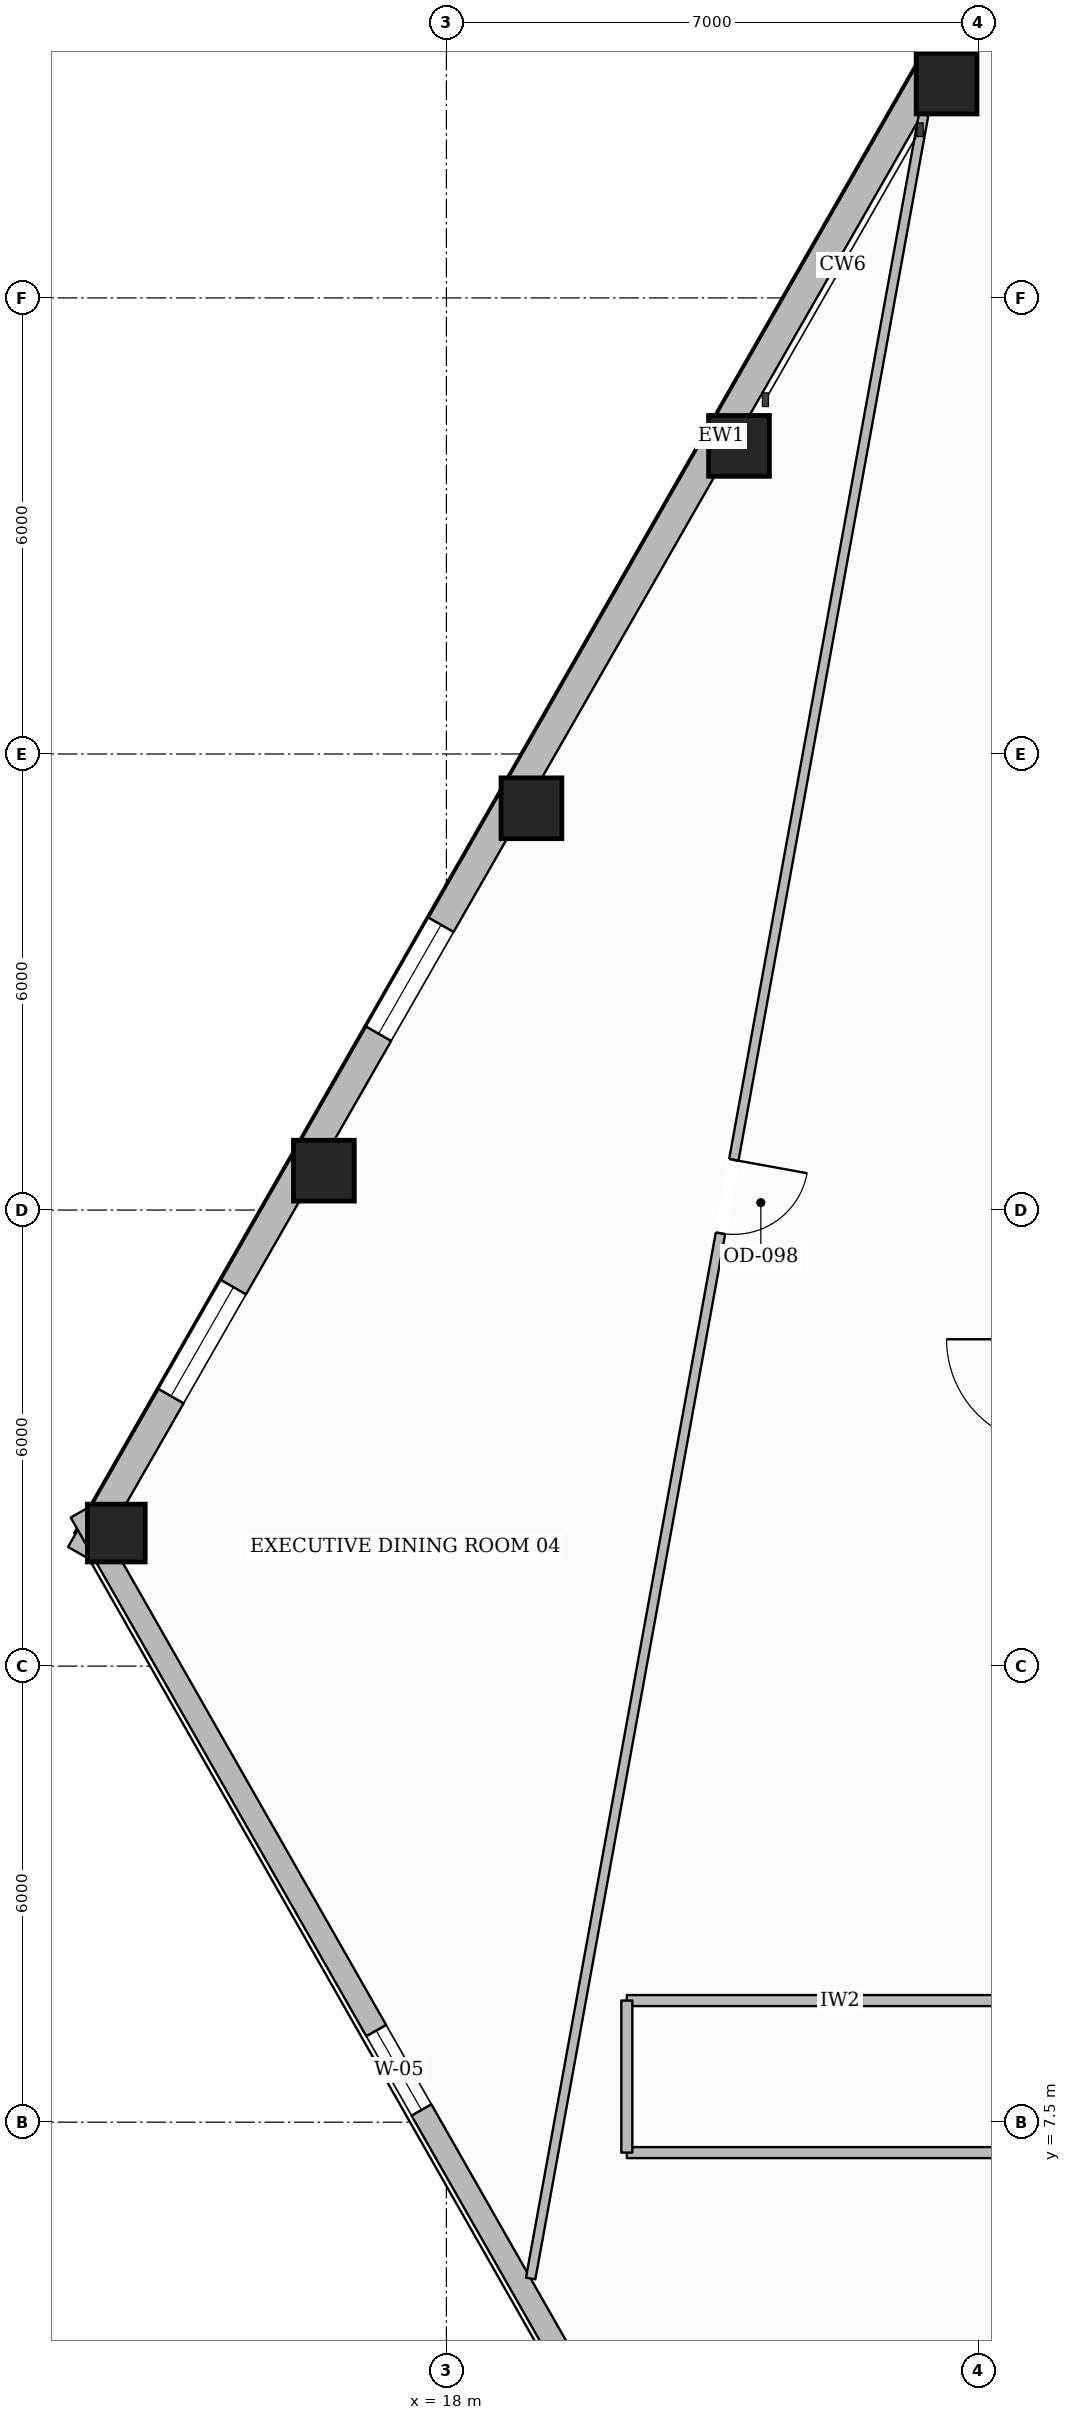
"""IFC4 building model, lengths in metres.
Left out: names, types, materials, properties, quantities, classifications, styles, units other than length and angle.
Written with IfcOpenShell. Run it as: python <this file> out.ifc"""

import sys

from ifc_helpers import new_model, si_unit, direction, frame, frame_2d, origin, origin_2d, place, context, subcontext, project, spatial, rectangle, hollow_rectangle, extrude, element, fill, save


model = new_model("IFC4")
c1 = context("Model", 3, precision=1e-05, world=origin(), true_north=direction((0.0, 1.0)))
c2 = subcontext(c1, "Body", "Model", "MODEL_VIEW")
j1 = project(units=[si_unit("LENGTHUNIT", "METRE"), si_unit("PLANEANGLEUNIT", "RADIAN")], contexts=[c1])
p1 = place(None, origin())
s1 = spatial("IfcSite", under=j1, at=p1, CompositionType="ELEMENT")
p2 = place(p1, origin())
s2 = spatial("IfcBuilding", under=s1, at=p2, CompositionType="ELEMENT")
p3 = place(p2, frame((0.0, 0.0, 17.55)))
s3 = spatial("IfcBuildingStorey", under=s2, at=p3, CompositionType="ELEMENT", Elevation=17.55)
for number, where, z_axis, x_axis in (
    (1, (24.58, 34.32, 0.0), (0.0, 0.0, 1.0), (1.0, 0.0, 0.0)),
    (2, (21.849, 29.553, 0.0), (0.0, 0.0, 1.0), (1.0, 0.0, 0.0)),
    (3, (19.119, 24.785, 0.0), (0.0, 0.0, 1.0), (1.0, 0.0, 0.0)),
    (4, (16.388, 20.018, 0.0), (0.0, 0.0, 1.0), (1.0, 0.0, 0.0)),
):
    element("IfcColumn", number, at=place(p3, frame(where, z_axis=z_axis, x_axis=x_axis)), inside=s3, PredefinedType="COLUMN", context=c2, shape_type="SweptSolid", body=[
        extrude(hollow_rectangle(XDim=0.8, YDim=0.8, WallThickness=0.036, at=origin_2d()), origin(), (0.0, 0.0, 1.0), 3.59),
    ])
p4 = place(p3, frame((13.657, 15.25, 0.0), z_axis=(0.0, 0.0, 1.0), x_axis=(1.0, 0.0, 0.0)))
e5 = element("IfcColumn", 5, at=p4, inside=s3, PredefinedType="COLUMN", context=c2, shape_type="SweptSolid", body=[
    extrude(hollow_rectangle(XDim=0.76, YDim=0.76, WallThickness=0.035, at=origin_2d()), origin(), (0.0, 0.0, 1.0), 3.59),
])
p5 = place(p3, frame((13.187, 14.973, 0.0), z_axis=(0.0, 0.0, 1.0), x_axis=(0.497033240721, 0.867731500879, 0.0)))
e6 = element("IfcWall", 6, at=p5, inside=s3, PredefinedType="STANDARD", context=c2, shape_type="SweptSolid", body=[
    extrude(rectangle(XDim=33.917, YDim=0.38, at=frame_2d((16.958, 0.0))), origin(), (0.0, 0.0, 1.0), 2.97),
])
p6 = place(p5, frame((29.867, 0.0, 0.65)))
e7 = element("IfcOpeningElement", 7, at=p6, cuts=e6, PredefinedType="OPENING", context=c2, shape_type="SweptSolid", body=[
    extrude(rectangle(XDim=1.65, YDim=1.75, at=frame_2d((0.825, 0.875))), frame((0.0, 0.2, 0.0), z_axis=(0.0, -1.0, 0.0), x_axis=(1.0, 0.0, 0.0)), (0.0, 0.0, 1.0), 0.4),
])
p7 = place(p5, frame((24.373, 0.0, 0.65)))
e8 = element("IfcOpeningElement", 8, at=p7, cuts=e6, PredefinedType="OPENING", context=c2, shape_type="SweptSolid", body=[
    extrude(rectangle(XDim=1.65, YDim=1.75, at=frame_2d((0.825, 0.875))), frame((0.0, 0.2, 0.0), z_axis=(0.0, -1.0, 0.0), x_axis=(1.0, 0.0, 0.0)), (0.0, 0.0, 1.0), 0.4),
])
p8 = place(p5, frame((7.89, 0.0, 0.65)))
e9 = element("IfcOpeningElement", 9, at=p8, cuts=e6, PredefinedType="OPENING", context=c2, shape_type="SweptSolid", body=[
    extrude(rectangle(XDim=1.65, YDim=1.75, at=frame_2d((0.825, 0.875))), frame((0.0, 0.2, 0.0), z_axis=(0.0, -1.0, 0.0), x_axis=(1.0, 0.0, 0.0)), (0.0, 0.0, 1.0), 0.4),
])
p9 = place(p5, frame((2.396, 0.0, 0.65)))
e10 = element("IfcOpeningElement", 10, at=p9, cuts=e6, PredefinedType="OPENING", context=c2, shape_type="SweptSolid", body=[
    extrude(rectangle(XDim=1.65, YDim=1.75, at=frame_2d((0.825, 0.875))), frame((0.0, 0.2, 0.0), z_axis=(0.0, -1.0, 0.0), x_axis=(1.0, 0.0, 0.0)), (0.0, 0.0, 1.0), 0.4),
])
p10 = place(p3, frame((21.561, 0.837, 0.0), z_axis=(0.0, 0.0, 1.0), x_axis=(-0.495143545557, 0.868811181611, 0.0)))
e11 = element("IfcWall", 11, at=p10, inside=s3, PredefinedType="STANDARD", context=c2, shape_type="SweptSolid", body=[
    extrude(rectangle(XDim=16.91, YDim=0.3, at=frame_2d((8.455, 0.0))), origin(), (0.0, 0.0, 1.0), 2.97),
])
p11 = place(p10, frame((7.855, 0.0, 0.65)))
e12 = element("IfcOpeningElement", 12, at=p11, cuts=e11, PredefinedType="OPENING", context=c2, shape_type="SweptSolid", body=[
    extrude(rectangle(XDim=1.2, YDim=1.7, at=frame_2d((0.6, 0.85))), frame((0.0, 0.16, 0.0), z_axis=(0.0, -1.0, 0.0), x_axis=(1.0, 0.0, 0.0)), (0.0, 0.0, 1.0), 0.32),
])
for number, where, z_axis, x_axis in (
    (13, (20.374, 9.1, 0.0), (0.0, 0.0, 1.0), (1.0, 0.0, 0.0)),
    (14, (25.98, 7.1, 0.0), (0.0, 0.0, 1.0), (-1.0, 0.0, 0.0)),
):
    element("IfcWall", number, at=place(p3, frame(where, z_axis=z_axis, x_axis=x_axis)), inside=s3, PredefinedType="PARTITIONING", context=c2, shape_type="SweptSolid", body=[
        extrude(rectangle(XDim=5.606, YDim=0.145, at=frame_2d((2.803, 0.0))), origin(), (0.0, 0.0, 1.0), 3.59),
    ])
p12 = place(p3, frame((20.374, 7.1, 0.0), z_axis=(0.0, 0.0, 1.0), x_axis=(0.0, 1.0, 0.0)))
e15 = element("IfcWall", 15, at=p12, inside=s3, PredefinedType="PARTITIONING", context=c2, shape_type="SweptSolid", body=[
    extrude(rectangle(XDim=2.0, YDim=0.145, at=frame_2d((1.0, 0.0))), origin(), (0.0, 0.0, 1.0), 3.59),
])
p13 = place(p3, frame((24.279, 33.912, 0.0), z_axis=(0.0, 0.0, 1.0), x_axis=(-0.178708717874, -0.983902024673, 0.0)))
e16 = element("IfcWall", 16, at=p13, inside=s3, PredefinedType="PARTITIONING", context=c2, shape_type="SweptSolid", body=[
    extrude(rectangle(XDim=28.935, YDim=0.125, at=frame_2d((14.467, 0.0))), origin(), (0.0, 0.0, 1.0), 2.973),
])
p14 = place(p13, frame((13.978, 0.0, 0.0)))
e17 = element("IfcOpeningElement", 17, at=p14, cuts=e16, PredefinedType="OPENING", context=c2, shape_type="SweptSolid", body=[
    extrude(rectangle(XDim=0.98, YDim=2.15, at=frame_2d((0.49, 1.075))), frame((0.0, 0.073, 0.0), z_axis=(0.0, -1.0, 0.0), x_axis=(1.0, 0.0, 0.0)), (0.0, 0.0, 1.0), 0.145),
])
p15 = place(p8, origin())
e18 = element("IfcWindow", 18, at=p15, inside=s3, PartitioningType="SINGLE_PANEL", PredefinedType="WINDOW", context=c2, shape_type="SweptSolid", body=[
    extrude(rectangle(XDim=1.65, YDim=1.75, at=frame_2d((0.825, 0.875))), frame((0.0, 0.03, 0.0), z_axis=(0.0, -1.0, 0.0), x_axis=(1.0, 0.0, 0.0)), (0.0, 0.0, 1.0), 0.06),
])
fill(e9, e18)
p16 = place(p9, origin())
e19 = element("IfcWindow", 19, at=p16, inside=s3, PartitioningType="SINGLE_PANEL", PredefinedType="WINDOW", context=c2, shape_type="SweptSolid", body=[
    extrude(rectangle(XDim=1.65, YDim=1.75, at=frame_2d((0.825, 0.875))), frame((0.0, 0.03, 0.0), z_axis=(0.0, -1.0, 0.0), x_axis=(1.0, 0.0, 0.0)), (0.0, 0.0, 1.0), 0.06),
])
fill(e10, e19)
p17 = place(p11, origin())
e20 = element("IfcWindow", 20, at=p17, inside=s3, PartitioningType="SINGLE_PANEL", PredefinedType="WINDOW", context=c2, shape_type="SweptSolid", body=[
    extrude(rectangle(XDim=1.2, YDim=1.7, at=frame_2d((0.6, 0.85))), frame((0.0, 0.03, 0.0), z_axis=(0.0, -1.0, 0.0), x_axis=(1.0, 0.0, 0.0)), (0.0, 0.0, 1.0), 0.06),
])
fill(e12, e20)
p18 = place(p14, origin())
e21 = element("IfcDoor", 21, at=p18, inside=s3, OperationType="SINGLE_SWING_LEFT", PredefinedType="DOOR", context=c2, shape_type="SweptSolid", body=[
    extrude(rectangle(XDim=0.98, YDim=2.15, at=frame_2d((0.49, 1.075))), frame((0.0, 0.025, 0.0), z_axis=(0.0, -1.0, 0.0), x_axis=(1.0, 0.0, 0.0)), (0.0, 0.0, 1.0), 0.05),
])
fill(e17, e21)
save(model, sys.argv[1])
